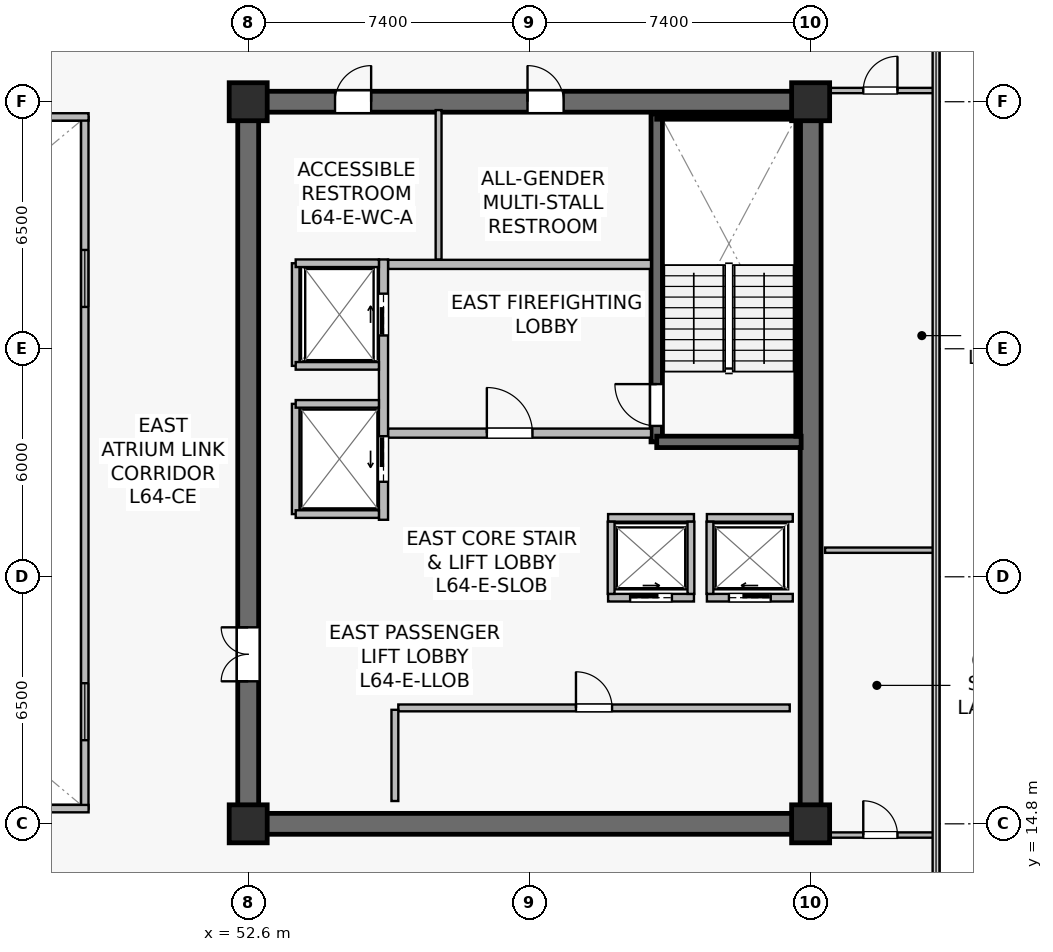
"""IFC4 building model, lengths in metres.
Left out: names, types, materials, properties, quantities, classifications, styles, units other than length and angle.
Written with IfcOpenShell. Run it as: python <this file> out.ifc"""

import sys

from ifc_helpers import new_model, si_unit, direction, frame, frame_2d, origin, origin_2d, place, context, subcontext, project, spatial, rectangle, extrude, source, transform, mapped, element, fill, save


model = new_model("IFC4")
c1 = context("Model", 3, precision=1e-05, world=origin(), true_north=direction((0.0, 1.0)))
c2 = subcontext(c1, "Body", "Model", "MODEL_VIEW")
j1 = project(units=[si_unit("LENGTHUNIT", "METRE"), si_unit("PLANEANGLEUNIT", "RADIAN")], contexts=[c1])
p1 = place(None, origin())
s1 = spatial("IfcSite", under=j1, at=p1, CompositionType="ELEMENT")
p2 = place(p1, origin())
s2 = spatial("IfcBuilding", under=s1, at=p2, CompositionType="ELEMENT")
p3 = place(p2, frame((0.0, 0.0, 267.0)))
s3 = spatial("IfcBuildingStorey", under=s2, at=p3, CompositionType="ELEMENT", Elevation=267.0)
p4 = place(p3, frame((52.325, 14.8, 0.0), z_axis=(0.0, 0.0, 1.0), x_axis=(1.0, 0.0, 0.0)))
e1 = element("IfcWall", 1, at=p4, inside=s3, PredefinedType="SHEAR", context=c2, shape_type="SweptSolid", body=[
    extrude(rectangle(XDim=15.35, YDim=0.55, at=frame_2d((7.675, 0.0))), origin(), (0.0, 0.0, 1.0), 3.8),
])
p5 = place(p3, frame((52.325, 33.8, 0.0), z_axis=(0.0, 0.0, 1.0), x_axis=(1.0, 0.0, 0.0)))
e2 = element("IfcWall", 2, at=p5, inside=s3, PredefinedType="SHEAR", context=c2, shape_type="SweptSolid", body=[
    extrude(rectangle(XDim=15.35, YDim=0.55, at=frame_2d((7.675, 0.0))), origin(), (0.0, 0.0, 1.0), 3.8),
])
p6 = place(p5, frame((7.625, 0.0, 0.0)))
e3 = element("IfcOpeningElement", 3, at=p6, cuts=e2, PredefinedType="OPENING", context=c2, shape_type="SweptSolid", body=[
    extrude(rectangle(XDim=0.95, YDim=2.15, at=frame_2d((0.475, 1.075))), frame((0.0, 0.285, 0.0), z_axis=(0.0, -1.0, 0.0), x_axis=(1.0, 0.0, 0.0)), (0.0, 0.0, 1.0), 0.57),
])
p7 = place(p5, frame((2.56, 0.0, 0.0)))
e4 = element("IfcOpeningElement", 4, at=p7, cuts=e2, PredefinedType="OPENING", context=c2, shape_type="SweptSolid", body=[
    extrude(rectangle(XDim=0.95, YDim=2.15, at=frame_2d((0.475, 1.075))), frame((0.0, 0.285, 0.0), z_axis=(0.0, -1.0, 0.0), x_axis=(1.0, 0.0, 0.0)), (0.0, 0.0, 1.0), 0.57),
])
p8 = place(p3, frame((52.6, 15.075, 0.0), z_axis=(0.0, 0.0, 1.0), x_axis=(0.0, 1.0, 0.0)))
e5 = element("IfcWall", 5, at=p8, inside=s3, PredefinedType="SHEAR", context=c2, shape_type="SweptSolid", body=[
    extrude(rectangle(XDim=18.45, YDim=0.55, at=frame_2d((9.225, 0.0))), origin(), (0.0, 0.0, 1.0), 3.8),
])
p9 = place(p8, frame((3.475, 0.0, 0.0)))
e6 = element("IfcOpeningElement", 6, at=p9, cuts=e5, PredefinedType="OPENING", context=c2, shape_type="SweptSolid", body=[
    extrude(rectangle(XDim=1.42, YDim=2.2, at=frame_2d((0.71, 1.1))), frame((0.0, 0.285, 0.0), z_axis=(0.0, -1.0, 0.0), x_axis=(1.0, 0.0, 0.0)), (0.0, 0.0, 1.0), 0.57),
])
p10 = place(p3, frame((67.4, 15.075, 0.0), z_axis=(0.0, 0.0, 1.0), x_axis=(0.0, 1.0, 0.0)))
e7 = element("IfcWall", 7, at=p10, inside=s3, PredefinedType="SHEAR", context=c2, shape_type="SweptSolid", body=[
    extrude(rectangle(XDim=18.45, YDim=0.55, at=frame_2d((9.225, 0.0))), origin(), (0.0, 0.0, 1.0), 3.8),
])
p11 = place(p3, frame((63.35, 24.85, 0.0), z_axis=(0.0, 0.0, 1.0), x_axis=(0.0, 1.0, 0.0)))
e8 = element("IfcWall", 8, at=p11, inside=s3, PredefinedType="SHEAR", context=c2, shape_type="SweptSolid", body=[
    extrude(rectangle(XDim=8.63, YDim=0.3, at=frame_2d((4.315, 0.0))), origin(), (0.0, 0.0, 1.0), 3.8),
])
p12 = place(p11, frame((0.42, 0.0, 0.0)))
e9 = element("IfcOpeningElement", 9, at=p12, cuts=e8, PredefinedType="OPENING", context=c2, shape_type="SweptSolid", body=[
    extrude(rectangle(XDim=1.1, YDim=2.15, at=frame_2d((0.55, 1.075))), frame((0.0, 0.16, 0.0), z_axis=(0.0, -1.0, 0.0), x_axis=(1.0, 0.0, 0.0)), (0.0, 0.0, 1.0), 0.32),
])
p13 = place(p3, frame((63.35, 24.85, 0.0), z_axis=(0.0, 0.0, 1.0), x_axis=(1.0, 0.0, 0.0)))
e10 = element("IfcWall", 10, at=p13, inside=s3, PredefinedType="SHEAR", context=c2, shape_type="SweptSolid", body=[
    extrude(rectangle(XDim=3.8, YDim=0.3, at=frame_2d((1.9, 0.0))), origin(), (0.0, 0.0, 1.0), 3.8),
])
p14 = place(p3, frame((63.35, 33.4, 0.0), z_axis=(0.0, 0.0, 1.0), x_axis=(1.0, 0.0, 0.0)))
e11 = element("IfcWall", 11, at=p14, inside=s3, PredefinedType="SOLIDWALL", context=c2, shape_type="SweptSolid", body=[
    extrude(rectangle(XDim=3.72, YDim=0.12, at=frame_2d((1.86, 0.0))), origin(), (0.0, 0.0, 1.0), 3.8),
])
p15 = place(p3, frame((67.07, 25.0, 0.0), z_axis=(0.0, 0.0, 1.0), x_axis=(0.0, 1.0, 0.0)))
e12 = element("IfcWall", 12, at=p15, inside=s3, PredefinedType="SOLIDWALL", context=c2, shape_type="SweptSolid", body=[
    extrude(rectangle(XDim=8.32, YDim=0.12, at=frame_2d((4.16, 0.0))), origin(), (0.0, 0.0, 1.0), 3.8),
])
m1 = source(origin(), c2, "Body", "SweptSolid", [
    extrude(rectangle(XDim=1.0, YDim=1.0, at=origin_2d()), origin(), (0.0, 0.0, 1.0), 4.1),
])
for number, where, z_axis, x_axis in (
    (13, (52.6, 14.8, 0.0), (0.0, 0.0, 1.0), (1.0, 0.0, 0.0)),
    (14, (67.4, 14.8, 0.0), (0.0, 0.0, 1.0), (1.0, 0.0, 0.0)),
    (15, (52.6, 33.8, 0.0), (0.0, 0.0, 1.0), (1.0, 0.0, 0.0)),
    (16, (67.4, 33.8, 0.0), (0.0, 0.0, 1.0), (1.0, 0.0, 0.0)),
):
    element("IfcColumn", number, at=place(p3, frame(where, z_axis=z_axis, x_axis=x_axis)), inside=s3, PredefinedType="COLUMN", context=c2, shape_type="MappedRepresentation", body=[
        mapped(m1, transform((0.0, 0.0, 0.0), scale=1.0)),
    ])
p16 = place(p3, frame((56.28, 25.08, 0.0), z_axis=(0.0, 0.0, 1.0), x_axis=(1.0, 0.0, 0.0)))
e17 = element("IfcWall", 17, at=p16, inside=s3, PredefinedType="SOLIDWALL", context=c2, shape_type="SweptSolid", body=[
    extrude(rectangle(XDim=6.92, YDim=0.24, at=frame_2d((3.46, 0.0))), origin(), (0.0, 0.0, 1.0), 3.197),
])
p17 = place(p16, frame((2.6, 0.0, 0.0)))
e18 = element("IfcOpeningElement", 18, at=p17, cuts=e17, PredefinedType="OPENING", context=c2, shape_type="SweptSolid", body=[
    extrude(rectangle(XDim=1.2, YDim=2.16, at=frame_2d((0.6, 1.08))), frame((0.0, 0.13, 0.0), z_axis=(0.0, -1.0, 0.0), x_axis=(1.0, 0.0, 0.0)), (0.0, 0.0, 1.0), 0.26),
])
p18 = place(p3, frame((56.28, 29.52, 0.0), z_axis=(0.0, 0.0, 1.0), x_axis=(1.0, 0.0, 0.0)))
e19 = element("IfcWall", 19, at=p18, inside=s3, PredefinedType="SOLIDWALL", context=c2, shape_type="SweptSolid", body=[
    extrude(rectangle(XDim=6.92, YDim=0.24, at=frame_2d((3.46, 0.0))), origin(), (0.0, 0.0, 1.0), 3.197),
])
p19 = place(p3, frame((56.16, 22.8, 0.0), z_axis=(0.0, 0.0, 1.0), x_axis=(0.0, 1.0, 0.0)))
e20 = element("IfcWall", 20, at=p19, inside=s3, PredefinedType="SOLIDWALL", context=c2, shape_type="SweptSolid", body=[
    extrude(rectangle(XDim=6.85, YDim=0.24, at=frame_2d((3.425, 0.0))), origin(), (0.0, 0.0, 1.0), 2.935),
])
p20 = place(p19, frame((4.85, 0.0, 0.0)))
e21 = element("IfcOpeningElement", 21, at=p20, cuts=e20, PredefinedType="OPENING", context=c2, shape_type="SweptSolid", body=[
    extrude(rectangle(XDim=1.1, YDim=2.22, at=frame_2d((0.55, 1.11))), frame((0.0, 0.13, 0.0), z_axis=(0.0, -1.0, 0.0), x_axis=(1.0, 0.0, 0.0)), (0.0, 0.0, 1.0), 0.26),
])
p21 = place(p19, frame((1.0, 0.0, 0.0)))
e22 = element("IfcOpeningElement", 22, at=p21, cuts=e20, PredefinedType="OPENING", context=c2, shape_type="SweptSolid", body=[
    extrude(rectangle(XDim=1.2, YDim=2.22, at=frame_2d((0.6, 1.11))), frame((0.0, 0.13, 0.0), z_axis=(0.0, -1.0, 0.0), x_axis=(1.0, 0.0, 0.0)), (0.0, 0.0, 1.0), 0.26),
])
p22 = place(p3, frame((64.67, 20.75, 0.0), z_axis=(0.0, 0.0, 1.0), x_axis=(1.0, 0.0, 0.0)))
e23 = element("IfcWall", 23, at=p22, inside=s3, PredefinedType="SOLIDWALL", context=c2, shape_type="SweptSolid", body=[
    extrude(rectangle(XDim=2.26, YDim=0.2, at=frame_2d((1.13, 0.0))), origin(), (0.0, 0.0, 1.0), 3.8),
])
p23 = place(p22, frame((0.58, 0.0, 0.0)))
e24 = element("IfcOpeningElement", 24, at=p23, cuts=e23, PredefinedType="OPENING", context=c2, shape_type="SweptSolid", body=[
    extrude(rectangle(XDim=1.1, YDim=2.22, at=frame_2d((0.55, 1.11))), frame((0.0, 0.11, 0.0), z_axis=(0.0, -1.0, 0.0), x_axis=(1.0, 0.0, 0.0)), (0.0, 0.0, 1.0), 0.22),
])
p24 = place(p3, frame((64.67, 22.85, 0.0), z_axis=(0.0, 0.0, 1.0), x_axis=(1.0, 0.0, 0.0)))
e25 = element("IfcWall", 25, at=p24, inside=s3, PredefinedType="SOLIDWALL", context=c2, shape_type="SweptSolid", body=[
    extrude(rectangle(XDim=2.26, YDim=0.2, at=frame_2d((1.13, 0.0))), origin(), (0.0, 0.0, 1.0), 3.8),
])
p25 = place(p3, frame((64.75, 20.85, 0.0), z_axis=(0.0, 0.0, 1.0), x_axis=(0.0, 1.0, 0.0)))
e26 = element("IfcWall", 26, at=p25, inside=s3, PredefinedType="SOLIDWALL", context=c2, shape_type="SweptSolid", body=[
    extrude(rectangle(XDim=1.9, YDim=0.18, at=frame_2d((0.95, 0.0))), origin(), (0.0, 0.0, 1.0), 3.8),
])
p26 = place(p3, frame((62.07, 20.75, 0.0), z_axis=(0.0, 0.0, 1.0), x_axis=(1.0, 0.0, 0.0)))
e27 = element("IfcWall", 27, at=p26, inside=s3, PredefinedType="SOLIDWALL", context=c2, shape_type="SweptSolid", body=[
    extrude(rectangle(XDim=2.26, YDim=0.2, at=frame_2d((1.13, 0.0))), origin(), (0.0, 0.0, 1.0), 3.8),
])
p27 = place(p26, frame((0.58, 0.0, 0.0)))
e28 = element("IfcOpeningElement", 28, at=p27, cuts=e27, PredefinedType="OPENING", context=c2, shape_type="SweptSolid", body=[
    extrude(rectangle(XDim=1.1, YDim=2.22, at=frame_2d((0.55, 1.11))), frame((0.0, 0.11, 0.0), z_axis=(0.0, -1.0, 0.0), x_axis=(1.0, 0.0, 0.0)), (0.0, 0.0, 1.0), 0.22),
])
p28 = place(p3, frame((62.07, 22.85, 0.0), z_axis=(0.0, 0.0, 1.0), x_axis=(1.0, 0.0, 0.0)))
e29 = element("IfcWall", 29, at=p28, inside=s3, PredefinedType="SOLIDWALL", context=c2, shape_type="SweptSolid", body=[
    extrude(rectangle(XDim=2.26, YDim=0.2, at=frame_2d((1.13, 0.0))), origin(), (0.0, 0.0, 1.0), 3.8),
])
for number, where, z_axis, x_axis in (
    (30, (62.15, 20.85, 0.0), (0.0, 0.0, 1.0), (0.0, 1.0, 0.0)),
    (31, (64.25, 20.85, 0.0), (0.0, 0.0, 1.0), (0.0, 1.0, 0.0)),
):
    element("IfcWall", number, at=place(p3, frame(where, z_axis=z_axis, x_axis=x_axis)), inside=s3, PredefinedType="SOLIDWALL", context=c2, shape_type="SweptSolid", body=[
        extrude(rectangle(XDim=1.9, YDim=0.18, at=frame_2d((0.95, 0.0))), origin(), (0.0, 0.0, 1.0), 3.8),
    ])
p29 = place(p3, frame((53.85, 26.85, 0.0), z_axis=(0.0, 0.0, 1.0), x_axis=(0.0, 1.0, 0.0)))
e32 = element("IfcWall", 32, at=p29, inside=s3, PredefinedType="SOLIDWALL", context=c2, shape_type="SweptSolid", body=[
    extrude(rectangle(XDim=2.7, YDim=0.2, at=frame_2d((1.35, 0.0))), origin(), (0.0, 0.0, 1.0), 3.8),
])
p30 = place(p3, frame((53.85, 29.55, 0.0), z_axis=(0.0, 0.0, 1.0), x_axis=(1.0, 0.0, 0.0)))
e33 = element("IfcWall", 33, at=p30, inside=s3, PredefinedType="SOLIDWALL", context=c2, shape_type="SweptSolid", body=[
    extrude(rectangle(XDim=2.19, YDim=0.2, at=frame_2d((1.095, 0.0))), origin(), (0.0, 0.0, 1.0), 3.8),
])
p31 = place(p3, frame((53.85, 26.85, 0.0), z_axis=(0.0, 0.0, 1.0), x_axis=(1.0, 0.0, 0.0)))
e34 = element("IfcWall", 34, at=p31, inside=s3, PredefinedType="SOLIDWALL", context=c2, shape_type="SweptSolid", body=[
    extrude(rectangle(XDim=2.19, YDim=0.2, at=frame_2d((1.095, 0.0))), origin(), (0.0, 0.0, 1.0), 3.197),
])
p32 = place(p3, frame((53.85, 22.95, 0.0), z_axis=(0.0, 0.0, 1.0), x_axis=(0.0, 1.0, 0.0)))
e35 = element("IfcWall", 35, at=p32, inside=s3, PredefinedType="SOLIDWALL", context=c2, shape_type="SweptSolid", body=[
    extrude(rectangle(XDim=2.9, YDim=0.2, at=frame_2d((1.45, 0.0))), origin(), (0.0, 0.0, 1.0), 2.935),
])
for number, where, z_axis, x_axis in (
    (36, (53.85, 25.85, 0.0), (0.0, 0.0, 1.0), (1.0, 0.0, 0.0)),
    (37, (53.85, 22.95, 0.0), (0.0, 0.0, 1.0), (1.0, 0.0, 0.0)),
):
    element("IfcWall", number, at=place(p3, frame(where, z_axis=z_axis, x_axis=x_axis)), inside=s3, PredefinedType="SOLIDWALL", context=c2, shape_type="SweptSolid", body=[
        extrude(rectangle(XDim=2.19, YDim=0.2, at=frame_2d((1.095, 0.0))), origin(), (0.0, 0.0, 1.0), 3.8),
    ])
p33 = place(p3, frame((56.55, 17.85, 0.0), z_axis=(0.0, 0.0, 1.0), x_axis=(1.0, 0.0, 0.0)))
e38 = element("IfcWall", 38, at=p33, inside=s3, PredefinedType="SOLIDWALL", context=c2, shape_type="SweptSolid", body=[
    extrude(rectangle(XDim=10.3, YDim=0.18, at=frame_2d((5.15, 0.0))), origin(), (0.0, 0.0, 1.0), 3.197),
])
p34 = place(p33, frame((4.675, 0.0, 0.0)))
e39 = element("IfcOpeningElement", 39, at=p34, cuts=e38, PredefinedType="OPENING", context=c2, shape_type="SweptSolid", body=[
    extrude(rectangle(XDim=0.95, YDim=2.15, at=frame_2d((0.475, 1.075))), frame((0.0, 0.1, 0.0), z_axis=(0.0, -1.0, 0.0), x_axis=(1.0, 0.0, 0.0)), (0.0, 0.0, 1.0), 0.2),
])
p35 = place(p3, frame((56.46, 15.4, 0.0), z_axis=(0.0, 0.0, 1.0), x_axis=(0.0, 1.0, 0.0)))
e40 = element("IfcWall", 40, at=p35, inside=s3, PredefinedType="SOLIDWALL", context=c2, shape_type="SweptSolid", body=[
    extrude(rectangle(XDim=2.4, YDim=0.18, at=frame_2d((1.2, 0.0))), origin(), (0.0, 0.0, 1.0), 3.8),
])
p36 = place(p3, frame((57.61, 29.65, 0.0), z_axis=(0.0, 0.0, 1.0), x_axis=(0.0, 1.0, 0.0)))
e41 = element("IfcWall", 41, at=p36, inside=s3, PredefinedType="PLUMBINGWALL", context=c2, shape_type="SweptSolid", body=[
    extrude(rectangle(XDim=3.93, YDim=0.155, at=frame_2d((1.965, 0.0))), origin(), (0.0, 0.0, 1.0), 3.8),
])
p37 = place(p3, frame((48.3, 15.2, 0.0), z_axis=(0.0, 0.0, 1.0), x_axis=(0.0, 1.0, 0.0)))
e42 = element("IfcWall", 42, at=p37, inside=s3, PredefinedType="SOLIDWALL", context=c2, shape_type="SweptSolid", body=[
    extrude(rectangle(XDim=18.2, YDim=0.195, at=frame_2d((9.1, 0.0))), origin(), (0.0, 0.0, 1.0), 3.8),
])
p38 = place(p37, frame((1.8, 0.0, 0.9)))
e43 = element("IfcOpeningElement", 43, at=p38, cuts=e42, PredefinedType="OPENING", context=c2, shape_type="SweptSolid", body=[
    extrude(rectangle(XDim=1.5, YDim=1.4, at=frame_2d((0.75, 0.7))), frame((0.0, 0.107, 0.0), z_axis=(0.0, -1.0, 0.0), x_axis=(1.0, 0.0, 0.0)), (0.0, 0.0, 1.0), 0.215),
])
p39 = place(p37, frame((13.2, 0.0, 0.9)))
e44 = element("IfcOpeningElement", 44, at=p39, cuts=e42, PredefinedType="OPENING", context=c2, shape_type="SweptSolid", body=[
    extrude(rectangle(XDim=1.5, YDim=1.4, at=frame_2d((0.75, 0.7))), frame((0.0, 0.107, 0.0), z_axis=(0.0, -1.0, 0.0), x_axis=(1.0, 0.0, 0.0)), (0.0, 0.0, 1.0), 0.215),
])
for number, where, z_axis, x_axis in (
    (45, (26.4, 15.2, 0.0), (0.0, 0.0, 1.0), (1.0, 0.0, 0.0)),
    (46, (26.4, 33.4, 0.0), (0.0, 0.0, 1.0), (1.0, 0.0, 0.0)),
):
    element("IfcWall", number, at=place(p3, frame(where, z_axis=z_axis, x_axis=x_axis)), inside=s3, PredefinedType="SOLIDWALL", context=c2, shape_type="SweptSolid", body=[
        extrude(rectangle(XDim=22.0, YDim=0.195, at=frame_2d((11.0, 0.0))), origin(), (0.0, 0.0, 1.0), 3.8),
    ])
p40 = place(p3, frame((67.78, 22.0, 0.0), z_axis=(0.0, 0.0, 1.0), x_axis=(1.0, 0.0, 0.0)))
e47 = element("IfcWall", 47, at=p40, inside=s3, PredefinedType="PARTITIONING", context=c2, shape_type="SweptSolid", body=[
    extrude(rectangle(XDim=2.91, YDim=0.14, at=frame_2d((1.455, 0.0))), origin(), (0.0, 0.0, 1.0), 3.8),
])
p41 = place(p3, frame((67.78, 14.505, 0.0), z_axis=(0.0, 0.0, 1.0), x_axis=(1.0, 0.0, 0.0)))
e48 = element("IfcWall", 48, at=p41, inside=s3, PredefinedType="PARTITIONING", context=c2, shape_type="SweptSolid", body=[
    extrude(rectangle(XDim=2.91, YDim=0.14, at=frame_2d((1.455, 0.0))), origin(), (0.0, 0.0, 1.0), 3.8),
])
p42 = place(p41, frame((1.005, 0.0, 0.0)))
e49 = element("IfcOpeningElement", 49, at=p42, cuts=e48, PredefinedType="OPENING", context=c2, shape_type="SweptSolid", body=[
    extrude(rectangle(XDim=0.9, YDim=2.1, at=frame_2d((0.45, 1.05))), frame((0.0, 0.08, 0.0), z_axis=(0.0, -1.0, 0.0), x_axis=(1.0, 0.0, 0.0)), (0.0, 0.0, 1.0), 0.16),
])
p43 = place(p3, frame((67.78, 34.095, 0.0), z_axis=(0.0, 0.0, 1.0), x_axis=(1.0, 0.0, 0.0)))
e50 = element("IfcWall", 50, at=p43, inside=s3, PredefinedType="PARTITIONING", context=c2, shape_type="SweptSolid", body=[
    extrude(rectangle(XDim=2.91, YDim=0.14, at=frame_2d((1.455, 0.0))), origin(), (0.0, 0.0, 1.0), 3.8),
])
p44 = place(p43, frame((1.005, 0.0, 0.0)))
e51 = element("IfcOpeningElement", 51, at=p44, cuts=e50, PredefinedType="OPENING", context=c2, shape_type="SweptSolid", body=[
    extrude(rectangle(XDim=0.9, YDim=2.1, at=frame_2d((0.45, 1.05))), frame((0.0, 0.08, 0.0), z_axis=(0.0, -1.0, 0.0), x_axis=(1.0, 0.0, 0.0)), (0.0, 0.0, 1.0), 0.16),
])
m2 = source(origin(), c2, "Body", "SweptSolid", [
    extrude(rectangle(XDim=1.5, YDim=1.4, at=frame_2d((0.75, 0.7))), frame((0.0, 0.03, 0.0), z_axis=(0.0, -1.0, 0.0), x_axis=(1.0, 0.0, 0.0)), (0.0, 0.0, 1.0), 0.06),
])
p45 = place(p38, origin())
e52 = element("IfcWindow", 52, at=p45, inside=s3, PartitioningType="SINGLE_PANEL", PredefinedType="WINDOW", context=c2, shape_type="MappedRepresentation", body=[
    mapped(m2, transform((0.0, 0.0, 0.0), scale=1.0)),
])
fill(e43, e52)
p46 = place(p39, origin())
e53 = element("IfcWindow", 53, at=p46, inside=s3, PartitioningType="SINGLE_PANEL", PredefinedType="WINDOW", context=c2, shape_type="MappedRepresentation", body=[
    mapped(m2, transform((0.0, 0.0, 0.0), scale=1.0)),
])
fill(e44, e53)
m3 = source(origin(), c2, "Body", "SweptSolid", [
    extrude(rectangle(XDim=1.1, YDim=2.15, at=frame_2d((0.55, 1.075))), frame((0.0, 0.025, 0.0), z_axis=(0.0, -1.0, 0.0), x_axis=(1.0, 0.0, 0.0)), (0.0, 0.0, 1.0), 0.05),
])
p47 = place(p12, origin())
e54 = element("IfcDoor", 54, at=p47, inside=s3, OperationType="SINGLE_SWING_RIGHT", PredefinedType="DOOR", context=c2, shape_type="MappedRepresentation", body=[
    mapped(m3, transform((0.0, 0.0, 0.0), scale=1.0)),
])
fill(e9, e54)
m4 = source(origin(), c2, "Body", "SweptSolid", [
    extrude(rectangle(XDim=1.2, YDim=2.16, at=frame_2d((0.6, 1.08))), frame((0.0, 0.025, 0.0), z_axis=(0.0, -1.0, 0.0), x_axis=(1.0, 0.0, 0.0)), (0.0, 0.0, 1.0), 0.05),
])
p48 = place(p17, origin())
e55 = element("IfcDoor", 55, at=p48, inside=s3, OperationType="SINGLE_SWING_LEFT", PredefinedType="DOOR", context=c2, shape_type="MappedRepresentation", body=[
    mapped(m4, transform((0.0, 0.0, 0.0), scale=1.0)),
])
fill(e18, e55)
m5 = source(origin(), c2, "Body", "SweptSolid", [
    extrude(rectangle(XDim=1.1, YDim=2.22, at=frame_2d((0.55, 1.11))), frame((0.0, 0.025, 0.0), z_axis=(0.0, -1.0, 0.0), x_axis=(1.0, 0.0, 0.0)), (0.0, 0.0, 1.0), 0.05),
])
p49 = place(p23, origin())
e56 = element("IfcDoor", 56, at=p49, inside=s3, OperationType="SLIDING_TO_LEFT", PredefinedType="USERDEFINED", context=c2, shape_type="MappedRepresentation", body=[
    mapped(m5, transform((0.0, 0.0, 0.0), scale=1.0)),
])
fill(e24, e56)
p50 = place(p27, origin())
e57 = element("IfcDoor", 57, at=p50, inside=s3, OperationType="SLIDING_TO_RIGHT", PredefinedType="USERDEFINED", context=c2, shape_type="MappedRepresentation", body=[
    mapped(m5, transform((0.0, 0.0, 0.0), scale=1.0)),
])
fill(e28, e57)
p51 = place(p20, origin())
e58 = element("IfcDoor", 58, at=p51, inside=s3, OperationType="SLIDING_TO_RIGHT", PredefinedType="USERDEFINED", context=c2, shape_type="MappedRepresentation", body=[
    mapped(m5, transform((0.0, 0.0, 0.0), scale=1.0)),
])
fill(e21, e58)
m6 = source(origin(), c2, "Body", "SweptSolid", [
    extrude(rectangle(XDim=1.2, YDim=2.22, at=frame_2d((0.6, 1.11))), frame((0.0, 0.025, 0.0), z_axis=(0.0, -1.0, 0.0), x_axis=(1.0, 0.0, 0.0)), (0.0, 0.0, 1.0), 0.05),
])
p52 = place(p21, origin())
e59 = element("IfcDoor", 59, at=p52, inside=s3, OperationType="SLIDING_TO_LEFT", PredefinedType="USERDEFINED", context=c2, shape_type="MappedRepresentation", body=[
    mapped(m6, transform((0.0, 0.0, 0.0), scale=1.0)),
])
fill(e22, e59)
m7 = source(origin(), c2, "Body", "SweptSolid", [
    extrude(rectangle(XDim=0.95, YDim=2.15, at=frame_2d((0.475, 1.075))), frame((0.0, 0.025, 0.0), z_axis=(0.0, -1.0, 0.0), x_axis=(1.0, 0.0, 0.0)), (0.0, 0.0, 1.0), 0.05),
])
p53 = place(p34, origin())
e60 = element("IfcDoor", 60, at=p53, inside=s3, OperationType="SINGLE_SWING_LEFT", PredefinedType="DOOR", context=c2, shape_type="MappedRepresentation", body=[
    mapped(m7, transform((0.0, 0.0, 0.0), scale=1.0)),
])
fill(e39, e60)
m8 = source(origin(), c2, "Body", "SweptSolid", [
    extrude(rectangle(XDim=1.42, YDim=2.2, at=frame_2d((0.71, 1.1))), frame((0.0, 0.025, 0.0), z_axis=(0.0, -1.0, 0.0), x_axis=(1.0, 0.0, 0.0)), (0.0, 0.0, 1.0), 0.05),
])
p54 = place(p9, origin())
e61 = element("IfcDoor", 61, at=p54, inside=s3, OperationType="DOUBLE_DOOR_SINGLE_SWING", PredefinedType="DOOR", context=c2, shape_type="MappedRepresentation", body=[
    mapped(m8, transform((0.0, 0.0, 0.0), scale=1.0)),
])
fill(e6, e61)
p55 = place(p6, origin())
e62 = element("IfcDoor", 62, at=p55, inside=s3, OperationType="SINGLE_SWING_LEFT", PredefinedType="DOOR", context=c2, shape_type="MappedRepresentation", body=[
    mapped(m7, transform((0.0, 0.0, 0.0), scale=1.0)),
])
fill(e3, e62)
p56 = place(p7, origin())
e63 = element("IfcDoor", 63, at=p56, inside=s3, OperationType="SINGLE_SWING_RIGHT", PredefinedType="DOOR", context=c2, shape_type="MappedRepresentation", body=[
    mapped(m7, transform((0.0, 0.0, 0.0), scale=1.0)),
])
fill(e4, e63)
m9 = source(origin(), c2, "Body", "SweptSolid", [
    extrude(rectangle(XDim=0.9, YDim=2.1, at=frame_2d((0.45, 1.05))), frame((0.0, 0.025, 0.0), z_axis=(0.0, -1.0, 0.0), x_axis=(1.0, 0.0, 0.0)), (0.0, 0.0, 1.0), 0.05),
])
p57 = place(p42, origin())
e64 = element("IfcDoor", 64, at=p57, inside=s3, OperationType="SINGLE_SWING_LEFT", PredefinedType="DOOR", context=c2, shape_type="MappedRepresentation", body=[
    mapped(m9, transform((0.0, 0.0, 0.0), scale=1.0)),
])
fill(e49, e64)
p58 = place(p44, origin())
e65 = element("IfcDoor", 65, at=p58, inside=s3, OperationType="SINGLE_SWING_RIGHT", PredefinedType="DOOR", context=c2, shape_type="MappedRepresentation", body=[
    mapped(m9, transform((0.0, 0.0, 0.0), scale=1.0)),
])
fill(e51, e65)
save(model, sys.argv[1])
